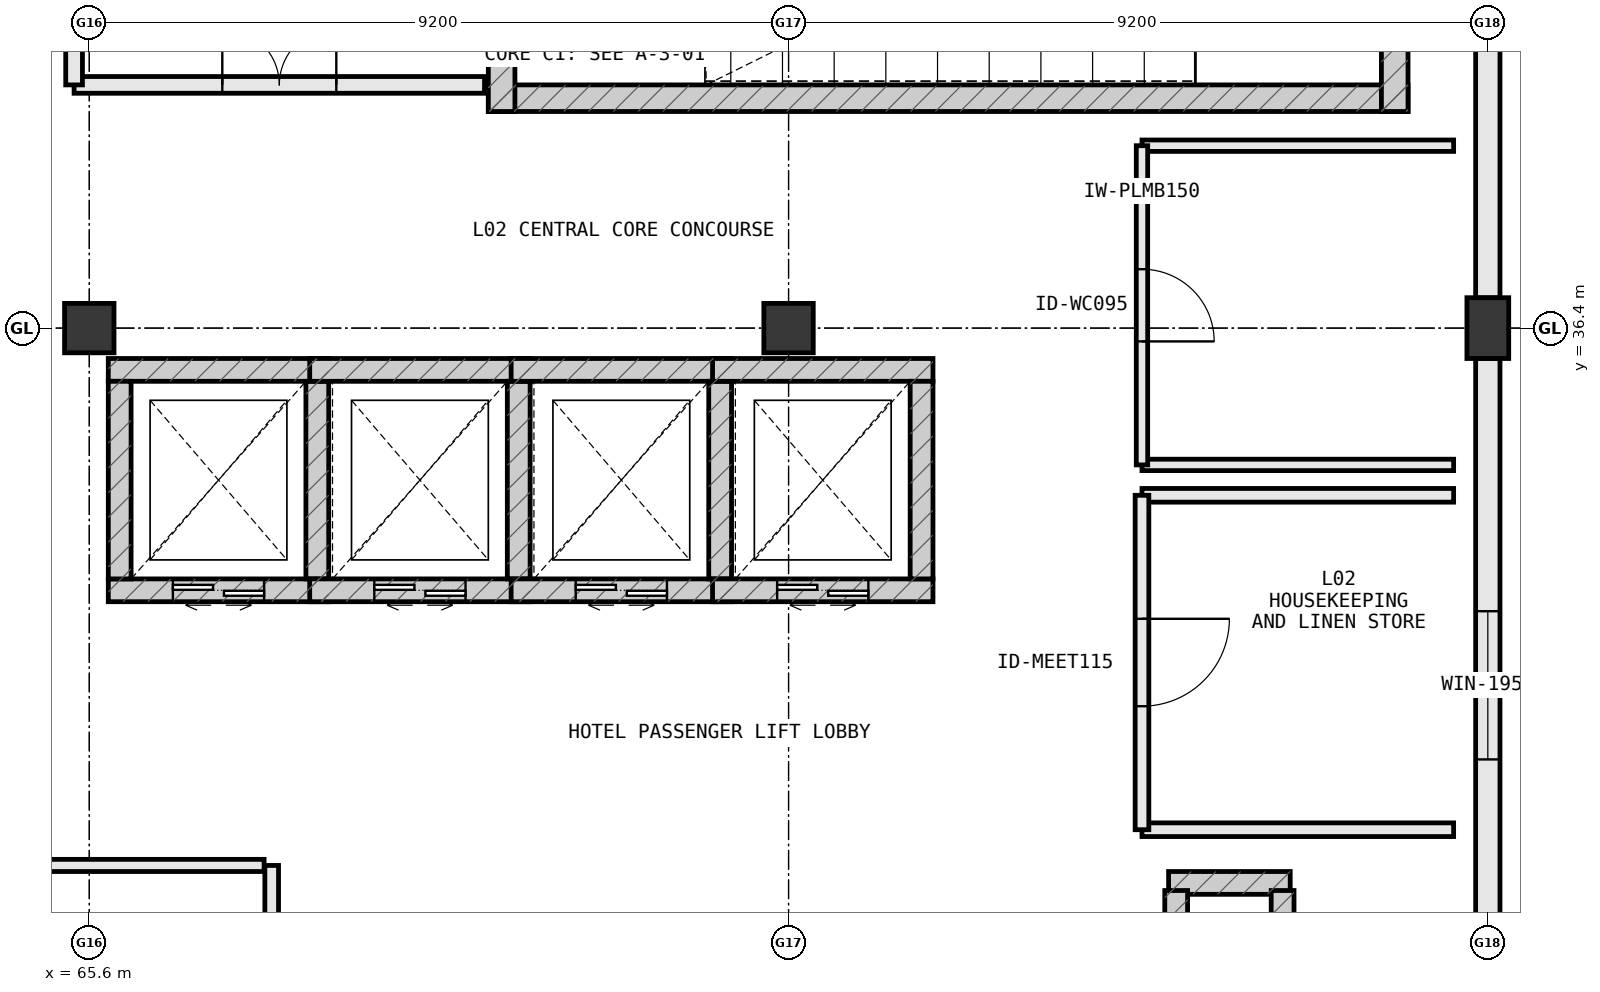
"""IFC4 building model, lengths in metres.
Left out: names, types, materials, properties, quantities, classifications, styles, units other than length and angle.
Written with IfcOpenShell. Run it as: python <this file> out.ifc"""

import sys

from ifc_helpers import new_model, si_unit, direction, frame, frame_2d, origin, origin_2d, place, context, subcontext, project, spatial, rectangle, extrude, element, fill, save


model = new_model("IFC4")
c1 = context("Model", 3, precision=1e-05, world=origin(), true_north=direction((0.0, 1.0)))
c2 = subcontext(c1, "Body", "Model", "MODEL_VIEW")
j1 = project(units=[si_unit("LENGTHUNIT", "METRE"), si_unit("PLANEANGLEUNIT", "RADIAN")], contexts=[c1])
p1 = place(None, origin())
s1 = spatial("IfcSite", under=j1, at=p1, CompositionType="ELEMENT")
p2 = place(p1, origin())
s2 = spatial("IfcBuilding", under=s1, at=p2, CompositionType="ELEMENT")
p3 = place(p2, frame((0.0, 0.0, 10.8)))
s3 = spatial("IfcBuildingStorey", under=s2, at=p3, CompositionType="ELEMENT", Elevation=10.8)
p4 = place(p3, frame((74.8, 36.4, 0.0), z_axis=(0.0, 0.0, 1.0), x_axis=(1.0, 0.0, 0.0)))
e1 = element("IfcColumn", 1, at=p4, inside=s3, PredefinedType="COLUMN", context=c2, shape_type="SweptSolid", body=[
    extrude(rectangle(XDim=0.65, YDim=0.65, at=origin_2d()), origin(), (0.0, 0.0, 1.0), 5.4),
])
p5 = place(p3, frame((84.0, 36.4, 0.0), z_axis=(0.0, 0.0, 1.0), x_axis=(1.0, 0.0, 0.0)))
e2 = element("IfcColumn", 2, at=p5, inside=s3, PredefinedType="PILASTER", context=c2, shape_type="SweptSolid", body=[
    extrude(rectangle(XDim=0.55, YDim=0.8, at=origin_2d()), origin(), (0.0, 0.0, 1.0), 5.4),
])
p6 = place(p3, frame((65.6, 36.4, 0.0), z_axis=(0.0, 0.0, 1.0), x_axis=(1.0, 0.0, 0.0)))
e3 = element("IfcColumn", 3, at=p6, inside=s3, PredefinedType="COLUMN", context=c2, shape_type="SweptSolid", body=[
    extrude(rectangle(XDim=0.65, YDim=0.65, at=origin_2d()), origin(), (0.0, 0.0, 1.0), 5.4),
])
p7 = place(p3, frame((81.4, 29.1, 0.0), z_axis=(0.0, 0.0, 1.0), x_axis=(-1.0, 0.0, 0.0)))
e4 = element("IfcWall", 4, at=p7, inside=s3, PredefinedType="SHEAR", context=c2, shape_type="SweptSolid", body=[
    extrude(rectangle(XDim=1.6, YDim=0.3, at=frame_2d((0.8, 0.0))), origin(), (0.0, 0.0, 1.0), 4.8),
])
for number, where, z_axis, x_axis in (
    (5, (79.9, 29.0, 0.0), (0.0, 0.0, 1.0), (0.0, -1.0, 0.0)),
    (6, (81.3, 27.8, 0.0), (0.0, 0.0, 1.0), (0.0, 1.0, 0.0)),
):
    element("IfcWall", number, at=place(p3, frame(where, z_axis=z_axis, x_axis=x_axis)), inside=s3, PredefinedType="SHEAR", context=c2, shape_type="SweptSolid", body=[
        extrude(rectangle(XDim=1.2, YDim=0.3, at=frame_2d((0.6, 0.0))), origin(), (0.0, 0.0, 1.0), 4.8),
    ])
p8 = place(p3, frame((84.0, 27.398, 0.0), z_axis=(0.0, 0.0, 1.0), x_axis=(0.0, 1.0, 0.0)))
e7 = element("IfcWall", 7, at=p8, inside=s3, PredefinedType="STANDARD", context=c2, shape_type="SweptSolid", body=[
    extrude(rectangle(XDim=8.604, YDim=0.32, at=frame_2d((4.302, 0.0))), origin(), (0.0, 0.0, 1.0), 4.332),
])
p9 = place(p8, frame((3.327, 0.0, 0.85)))
e8 = element("IfcOpeningElement", 8, at=p9, cuts=e7, PredefinedType="OPENING", context=c2, shape_type="SweptSolid", body=[
    extrude(rectangle(XDim=1.95, YDim=1.9, at=frame_2d((0.975, 0.95))), frame((0.0, 0.172, 0.0), z_axis=(0.0, -1.0, 0.0), x_axis=(1.0, 0.0, 0.0)), (0.0, 0.0, 1.0), 0.344),
])
p10 = place(p3, frame((84.0, 36.798, 0.0), z_axis=(0.0, 0.0, 1.0), x_axis=(0.0, 1.0, 0.0)))
e9 = element("IfcWall", 9, at=p10, inside=s3, PredefinedType="STANDARD", context=c2, shape_type="SweptSolid", body=[
    extrude(rectangle(XDim=10.004, YDim=0.32, at=frame_2d((5.002, 0.0))), origin(), (0.0, 0.0, 1.0), 4.332),
])
p11 = place(p10, frame((6.528, 0.0, 0.85)))
e10 = element("IfcOpeningElement", 10, at=p11, cuts=e9, PredefinedType="OPENING", context=c2, shape_type="SweptSolid", body=[
    extrude(rectangle(XDim=1.95, YDim=1.9, at=frame_2d((0.975, 0.95))), frame((0.0, 0.172, 0.0), z_axis=(0.0, -1.0, 0.0), x_axis=(1.0, 0.0, 0.0)), (0.0, 0.0, 1.0), 0.344),
])
p12 = place(p3, frame((70.85, 39.425, 0.0), z_axis=(0.0, 0.0, 1.0), x_axis=(1.0, 0.0, 0.0)))
e11 = element("IfcWall", 11, at=p12, inside=s3, PredefinedType="SHEAR", context=c2, shape_type="SweptSolid", body=[
    extrude(rectangle(XDim=12.1, YDim=0.35, at=frame_2d((6.05, 0.0))), origin(), (0.0, 0.0, 1.0), 5.4),
])
p13 = place(p3, frame((82.775, 39.25, 0.0), z_axis=(0.0, 0.0, 1.0), x_axis=(0.0, 1.0, 0.0)))
e12 = element("IfcWall", 12, at=p13, inside=s3, PredefinedType="SHEAR", context=c2, shape_type="SweptSolid", body=[
    extrude(rectangle(XDim=5.1, YDim=0.35, at=frame_2d((2.55, 0.0))), origin(), (0.0, 0.0, 1.0), 5.4),
])
p14 = place(p3, frame((71.025, 44.35, 0.0), z_axis=(0.0, 0.0, 1.0), x_axis=(0.0, -1.0, 0.0)))
e13 = element("IfcWall", 13, at=p14, inside=s3, PredefinedType="SHEAR", context=c2, shape_type="SweptSolid", body=[
    extrude(rectangle(XDim=5.1, YDim=0.35, at=frame_2d((2.55, 0.0))), origin(), (0.0, 0.0, 1.0), 5.4),
])
p15 = place(p14, frame((2.0, 0.0, 0.0)))
e14 = element("IfcOpeningElement", 14, at=p15, cuts=e13, PredefinedType="OPENING", context=c2, shape_type="SweptSolid", body=[
    extrude(rectangle(XDim=1.1, YDim=2.2, at=frame_2d((0.55, 1.1))), frame((0.0, 0.187, 0.0), z_axis=(0.0, -1.0, 0.0), x_axis=(1.0, 0.0, 0.0)), (0.0, 0.0, 1.0), 0.374),
])
p16 = place(p3, frame((65.85, 32.95, 0.0), z_axis=(0.0, 0.0, 1.0), x_axis=(1.0, 0.0, 0.0)))
e15 = element("IfcWall", 15, at=p16, inside=s3, PredefinedType="SHEAR", context=c2, shape_type="SweptSolid", body=[
    extrude(rectangle(XDim=2.9, YDim=0.3, at=frame_2d((1.45, 0.0))), origin(), (0.0, 0.0, 1.0), 5.4),
])
p17 = place(p16, frame((0.85, 0.0, 0.0)))
e16 = element("IfcOpeningElement", 16, at=p17, cuts=e15, PredefinedType="OPENING", context=c2, shape_type="SweptSolid", body=[
    extrude(rectangle(XDim=1.2, YDim=2.2, at=frame_2d((0.6, 1.1))), frame((0.0, 0.162, 0.0), z_axis=(0.0, -1.0, 0.0), x_axis=(1.0, 0.0, 0.0)), (0.0, 0.0, 1.0), 0.324),
])
p18 = place(p3, frame((68.75, 35.85, 0.0), z_axis=(0.0, 0.0, 1.0), x_axis=(-1.0, 0.0, 0.0)))
e17 = element("IfcWall", 17, at=p18, inside=s3, PredefinedType="SHEAR", context=c2, shape_type="SweptSolid", body=[
    extrude(rectangle(XDim=2.9, YDim=0.3, at=frame_2d((1.45, 0.0))), origin(), (0.0, 0.0, 1.0), 5.4),
])
for number, where, z_axis, x_axis in (
    (18, (68.6, 33.1, 0.0), (0.0, 0.0, 1.0), (0.0, 1.0, 0.0)),
    (19, (66.0, 35.7, 0.0), (0.0, 0.0, 1.0), (0.0, -1.0, 0.0)),
):
    element("IfcWall", number, at=place(p3, frame(where, z_axis=z_axis, x_axis=x_axis)), inside=s3, PredefinedType="SHEAR", context=c2, shape_type="SweptSolid", body=[
        extrude(rectangle(XDim=2.6, YDim=0.3, at=frame_2d((1.3, 0.0))), origin(), (0.0, 0.0, 1.0), 5.4),
    ])
p19 = place(p3, frame((68.5, 32.95, 0.0), z_axis=(0.0, 0.0, 1.0), x_axis=(1.0, 0.0, 0.0)))
e20 = element("IfcWall", 20, at=p19, inside=s3, PredefinedType="SHEAR", context=c2, shape_type="SweptSolid", body=[
    extrude(rectangle(XDim=2.9, YDim=0.3, at=frame_2d((1.45, 0.0))), origin(), (0.0, 0.0, 1.0), 5.4),
])
p20 = place(p19, frame((0.85, 0.0, 0.0)))
e21 = element("IfcOpeningElement", 21, at=p20, cuts=e20, PredefinedType="OPENING", context=c2, shape_type="SweptSolid", body=[
    extrude(rectangle(XDim=1.2, YDim=2.2, at=frame_2d((0.6, 1.1))), frame((0.0, 0.162, 0.0), z_axis=(0.0, -1.0, 0.0), x_axis=(1.0, 0.0, 0.0)), (0.0, 0.0, 1.0), 0.324),
])
p21 = place(p3, frame((71.4, 35.85, 0.0), z_axis=(0.0, 0.0, 1.0), x_axis=(-1.0, 0.0, 0.0)))
e22 = element("IfcWall", 22, at=p21, inside=s3, PredefinedType="SHEAR", context=c2, shape_type="SweptSolid", body=[
    extrude(rectangle(XDim=2.9, YDim=0.3, at=frame_2d((1.45, 0.0))), origin(), (0.0, 0.0, 1.0), 5.4),
])
p22 = place(p3, frame((71.25, 33.1, 0.0), z_axis=(0.0, 0.0, 1.0), x_axis=(0.0, 1.0, 0.0)))
e23 = element("IfcWall", 23, at=p22, inside=s3, PredefinedType="SHEAR", context=c2, shape_type="SweptSolid", body=[
    extrude(rectangle(XDim=2.6, YDim=0.3, at=frame_2d((1.3, 0.0))), origin(), (0.0, 0.0, 1.0), 5.4),
])
p23 = place(p3, frame((71.15, 32.95, 0.0), z_axis=(0.0, 0.0, 1.0), x_axis=(1.0, 0.0, 0.0)))
e24 = element("IfcWall", 24, at=p23, inside=s3, PredefinedType="SHEAR", context=c2, shape_type="SweptSolid", body=[
    extrude(rectangle(XDim=2.9, YDim=0.3, at=frame_2d((1.45, 0.0))), origin(), (0.0, 0.0, 1.0), 5.4),
])
p24 = place(p23, frame((0.85, 0.0, 0.0)))
e25 = element("IfcOpeningElement", 25, at=p24, cuts=e24, PredefinedType="OPENING", context=c2, shape_type="SweptSolid", body=[
    extrude(rectangle(XDim=1.2, YDim=2.2, at=frame_2d((0.6, 1.1))), frame((0.0, 0.162, 0.0), z_axis=(0.0, -1.0, 0.0), x_axis=(1.0, 0.0, 0.0)), (0.0, 0.0, 1.0), 0.324),
])
p25 = place(p3, frame((74.05, 35.85, 0.0), z_axis=(0.0, 0.0, 1.0), x_axis=(-1.0, 0.0, 0.0)))
e26 = element("IfcWall", 26, at=p25, inside=s3, PredefinedType="SHEAR", context=c2, shape_type="SweptSolid", body=[
    extrude(rectangle(XDim=2.9, YDim=0.3, at=frame_2d((1.45, 0.0))), origin(), (0.0, 0.0, 1.0), 5.4),
])
p26 = place(p3, frame((73.9, 33.1, 0.0), z_axis=(0.0, 0.0, 1.0), x_axis=(0.0, 1.0, 0.0)))
e27 = element("IfcWall", 27, at=p26, inside=s3, PredefinedType="SHEAR", context=c2, shape_type="SweptSolid", body=[
    extrude(rectangle(XDim=2.6, YDim=0.3, at=frame_2d((1.3, 0.0))), origin(), (0.0, 0.0, 1.0), 5.4),
])
p27 = place(p3, frame((73.8, 32.95, 0.0), z_axis=(0.0, 0.0, 1.0), x_axis=(1.0, 0.0, 0.0)))
e28 = element("IfcWall", 28, at=p27, inside=s3, PredefinedType="SHEAR", context=c2, shape_type="SweptSolid", body=[
    extrude(rectangle(XDim=2.9, YDim=0.3, at=frame_2d((1.45, 0.0))), origin(), (0.0, 0.0, 1.0), 5.4),
])
p28 = place(p27, frame((0.85, 0.0, 0.0)))
e29 = element("IfcOpeningElement", 29, at=p28, cuts=e28, PredefinedType="OPENING", context=c2, shape_type="SweptSolid", body=[
    extrude(rectangle(XDim=1.2, YDim=2.2, at=frame_2d((0.6, 1.1))), frame((0.0, 0.162, 0.0), z_axis=(0.0, -1.0, 0.0), x_axis=(1.0, 0.0, 0.0)), (0.0, 0.0, 1.0), 0.324),
])
p29 = place(p3, frame((76.7, 35.85, 0.0), z_axis=(0.0, 0.0, 1.0), x_axis=(-1.0, 0.0, 0.0)))
e30 = element("IfcWall", 30, at=p29, inside=s3, PredefinedType="SHEAR", context=c2, shape_type="SweptSolid", body=[
    extrude(rectangle(XDim=2.9, YDim=0.3, at=frame_2d((1.45, 0.0))), origin(), (0.0, 0.0, 1.0), 5.4),
])
p30 = place(p3, frame((76.55, 33.1, 0.0), z_axis=(0.0, 0.0, 1.0), x_axis=(0.0, 1.0, 0.0)))
e31 = element("IfcWall", 31, at=p30, inside=s3, PredefinedType="SHEAR", context=c2, shape_type="SweptSolid", body=[
    extrude(rectangle(XDim=2.6, YDim=0.3, at=frame_2d((1.3, 0.0))), origin(), (0.0, 0.0, 1.0), 5.4),
])
p31 = place(p3, frame((65.4, 39.6, 0.0), z_axis=(0.0, 0.0, 1.0), x_axis=(1.0, 0.0, 0.0)))
e32 = element("IfcWall", 32, at=p31, inside=s3, PredefinedType="STANDARD", context=c2, shape_type="SweptSolid", body=[
    extrude(rectangle(XDim=5.4, YDim=0.22, at=frame_2d((2.7, 0.0))), origin(), (0.0, 0.0, 1.0), 4.8),
])
p32 = place(p31, frame((1.95, 0.0, 0.0)))
e33 = element("IfcOpeningElement", 33, at=p32, cuts=e32, PredefinedType="OPENING", context=c2, shape_type="SweptSolid", body=[
    extrude(rectangle(XDim=1.5, YDim=2.2, at=frame_2d((0.75, 1.1))), frame((0.0, 0.122, 0.0), z_axis=(0.0, -1.0, 0.0), x_axis=(1.0, 0.0, 0.0)), (0.0, 0.0, 1.0), 0.244),
])
p33 = place(p3, frame((65.4, 43.85, 0.0), z_axis=(0.0, 0.0, 1.0), x_axis=(0.0, -1.0, 0.0)))
e34 = element("IfcWall", 34, at=p33, inside=s3, PredefinedType="STANDARD", context=c2, shape_type="SweptSolid", body=[
    extrude(rectangle(XDim=4.25, YDim=0.22, at=frame_2d((2.125, 0.0))), origin(), (0.0, 0.0, 1.0), 4.8),
])
p34 = place(p33, frame((1.375, 0.0, 0.0)))
e35 = element("IfcOpeningElement", 35, at=p34, cuts=e34, PredefinedType="OPENING", context=c2, shape_type="SweptSolid", body=[
    extrude(rectangle(XDim=1.5, YDim=2.2, at=frame_2d((0.75, 1.1))), frame((0.0, 0.122, 0.0), z_axis=(0.0, -1.0, 0.0), x_axis=(1.0, 0.0, 0.0)), (0.0, 0.0, 1.0), 0.244),
])
for number, where, z_axis, x_axis in (
    (36, (79.45, 29.8, 0.0), (0.0, 0.0, 1.0), (1.0, 0.0, 0.0)),
    (37, (83.55, 34.2, 0.0), (0.0, 0.0, 1.0), (-1.0, 0.0, 0.0)),
):
    element("IfcWall", number, at=place(p3, frame(where, z_axis=z_axis, x_axis=x_axis)), inside=s3, PredefinedType="PARTITIONING", context=c2, shape_type="SweptSolid", body=[
        extrude(rectangle(XDim=4.1, YDim=0.18, at=frame_2d((2.05, 0.0))), origin(), (0.0, 0.0, 1.0), 4.8),
    ])
p35 = place(p3, frame((79.45, 34.2, 0.0), z_axis=(0.0, 0.0, 1.0), x_axis=(0.0, -1.0, 0.0)))
e38 = element("IfcWall", 38, at=p35, inside=s3, PredefinedType="PARTITIONING", context=c2, shape_type="SweptSolid", body=[
    extrude(rectangle(XDim=4.4, YDim=0.18, at=frame_2d((2.2, 0.0))), origin(), (0.0, 0.0, 1.0), 4.8),
])
p36 = place(p35, frame((1.625, 0.0, 0.0)))
e39 = element("IfcOpeningElement", 39, at=p36, cuts=e38, PredefinedType="OPENING", context=c2, shape_type="SweptSolid", body=[
    extrude(rectangle(XDim=1.15, YDim=2.2, at=frame_2d((0.575, 1.1))), frame((0.0, 0.102, 0.0), z_axis=(0.0, -1.0, 0.0), x_axis=(1.0, 0.0, 0.0)), (0.0, 0.0, 1.0), 0.204),
])
for number, where, z_axis, x_axis in (
    (40, (79.45, 34.6, 0.0), (0.0, 0.0, 1.0), (1.0, 0.0, 0.0)),
    (41, (83.55, 38.8, 0.0), (0.0, 0.0, 1.0), (-1.0, 0.0, 0.0)),
):
    element("IfcWall", number, at=place(p3, frame(where, z_axis=z_axis, x_axis=x_axis)), inside=s3, PredefinedType="PLUMBINGWALL", context=c2, shape_type="SweptSolid", body=[
        extrude(rectangle(XDim=4.1, YDim=0.15, at=frame_2d((2.05, 0.0))), origin(), (0.0, 0.0, 1.0), 4.8),
    ])
p37 = place(p3, frame((79.45, 38.8, 0.0), z_axis=(0.0, 0.0, 1.0), x_axis=(0.0, -1.0, 0.0)))
e42 = element("IfcWall", 42, at=p37, inside=s3, PredefinedType="PLUMBINGWALL", context=c2, shape_type="SweptSolid", body=[
    extrude(rectangle(XDim=4.2, YDim=0.15, at=frame_2d((2.1, 0.0))), origin(), (0.0, 0.0, 1.0), 4.8),
])
p38 = place(p37, frame((1.625, 0.0, 0.0)))
e43 = element("IfcOpeningElement", 43, at=p38, cuts=e42, PredefinedType="OPENING", context=c2, shape_type="SweptSolid", body=[
    extrude(rectangle(XDim=0.95, YDim=2.15, at=frame_2d((0.475, 1.075))), frame((0.0, 0.087, 0.0), z_axis=(0.0, -1.0, 0.0), x_axis=(1.0, 0.0, 0.0)), (0.0, 0.0, 1.0), 0.174),
])
p39 = place(p3, frame((68.0, 23.85, 0.0), z_axis=(0.0, 0.0, 1.0), x_axis=(0.0, 1.0, 0.0)))
e44 = element("IfcWall", 44, at=p39, inside=s3, PredefinedType="PARTITIONING", context=c2, shape_type="SweptSolid", body=[
    extrude(rectangle(XDim=5.48, YDim=0.18, at=frame_2d((2.74, 0.0))), origin(), (0.0, 0.0, 1.0), 4.8),
])
p40 = place(p39, frame((3.22, 0.0, 0.0)))
e45 = element("IfcOpeningElement", 45, at=p40, cuts=e44, PredefinedType="OPENING", context=c2, shape_type="SweptSolid", body=[
    extrude(rectangle(XDim=1.0, YDim=2.2, at=frame_2d((0.5, 1.1))), frame((0.0, 0.102, 0.0), z_axis=(0.0, -1.0, 0.0), x_axis=(1.0, 0.0, 0.0)), (0.0, 0.0, 1.0), 0.204),
])
p41 = place(p3, frame((60.96, 29.33, 0.0), z_axis=(0.0, 0.0, 1.0), x_axis=(1.0, 0.0, 0.0)))
e46 = element("IfcWall", 46, at=p41, inside=s3, PredefinedType="PARTITIONING", context=c2, shape_type="SweptSolid", body=[
    extrude(rectangle(XDim=6.94, YDim=0.16, at=frame_2d((3.47, 0.0))), origin(), (0.0, 0.0, 1.0), 4.8),
])
p42 = place(p9, origin())
e47 = element("IfcWindow", 47, at=p42, inside=s3, PartitioningType="DOUBLE_PANEL_VERTICAL", PredefinedType="WINDOW", context=c2, shape_type="SweptSolid", body=[
    extrude(rectangle(XDim=1.95, YDim=1.9, at=frame_2d((0.975, 0.95))), frame((0.0, 0.03, 0.0), z_axis=(0.0, -1.0, 0.0), x_axis=(1.0, 0.0, 0.0)), (0.0, 0.0, 1.0), 0.06),
])
fill(e8, e47)
p43 = place(p17, origin())
e48 = element("IfcDoor", 48, at=p43, inside=s3, OperationType="DOUBLE_DOOR_SLIDING", PredefinedType="DOOR", context=c2, shape_type="SweptSolid", body=[
    extrude(rectangle(XDim=1.2, YDim=2.2, at=frame_2d((0.6, 1.1))), frame((0.0, 0.025, 0.0), z_axis=(0.0, -1.0, 0.0), x_axis=(1.0, 0.0, 0.0)), (0.0, 0.0, 1.0), 0.05),
])
fill(e16, e48)
p44 = place(p20, origin())
e49 = element("IfcDoor", 49, at=p44, inside=s3, OperationType="DOUBLE_DOOR_SLIDING", PredefinedType="DOOR", context=c2, shape_type="SweptSolid", body=[
    extrude(rectangle(XDim=1.2, YDim=2.2, at=frame_2d((0.6, 1.1))), frame((0.0, 0.025, 0.0), z_axis=(0.0, -1.0, 0.0), x_axis=(1.0, 0.0, 0.0)), (0.0, 0.0, 1.0), 0.05),
])
fill(e21, e49)
p45 = place(p24, origin())
e50 = element("IfcDoor", 50, at=p45, inside=s3, OperationType="DOUBLE_DOOR_SLIDING", PredefinedType="DOOR", context=c2, shape_type="SweptSolid", body=[
    extrude(rectangle(XDim=1.2, YDim=2.2, at=frame_2d((0.6, 1.1))), frame((0.0, 0.025, 0.0), z_axis=(0.0, -1.0, 0.0), x_axis=(1.0, 0.0, 0.0)), (0.0, 0.0, 1.0), 0.05),
])
fill(e25, e50)
p46 = place(p28, origin())
e51 = element("IfcDoor", 51, at=p46, inside=s3, OperationType="DOUBLE_DOOR_SLIDING", PredefinedType="DOOR", context=c2, shape_type="SweptSolid", body=[
    extrude(rectangle(XDim=1.2, YDim=2.2, at=frame_2d((0.6, 1.1))), frame((0.0, 0.025, 0.0), z_axis=(0.0, -1.0, 0.0), x_axis=(1.0, 0.0, 0.0)), (0.0, 0.0, 1.0), 0.05),
])
fill(e29, e51)
p47 = place(p32, origin())
e52 = element("IfcDoor", 52, at=p47, inside=s3, OperationType="DOUBLE_DOOR_SINGLE_SWING", PredefinedType="DOOR", context=c2, shape_type="SweptSolid", body=[
    extrude(rectangle(XDim=1.5, YDim=2.2, at=frame_2d((0.75, 1.1))), frame((0.0, 0.025, 0.0), z_axis=(0.0, -1.0, 0.0), x_axis=(1.0, 0.0, 0.0)), (0.0, 0.0, 1.0), 0.05),
])
fill(e33, e52)
p48 = place(p36, origin())
e53 = element("IfcDoor", 53, at=p48, inside=s3, OperationType="SINGLE_SWING_LEFT", PredefinedType="DOOR", context=c2, shape_type="SweptSolid", body=[
    extrude(rectangle(XDim=1.15, YDim=2.2, at=frame_2d((0.575, 1.1))), frame((0.0, 0.025, 0.0), z_axis=(0.0, -1.0, 0.0), x_axis=(1.0, 0.0, 0.0)), (0.0, 0.0, 1.0), 0.05),
])
fill(e39, e53)
p49 = place(p38, origin())
e54 = element("IfcDoor", 54, at=p49, inside=s3, OperationType="SINGLE_SWING_RIGHT", PredefinedType="DOOR", context=c2, shape_type="SweptSolid", body=[
    extrude(rectangle(XDim=0.95, YDim=2.15, at=frame_2d((0.475, 1.075))), frame((0.0, 0.025, 0.0), z_axis=(0.0, -1.0, 0.0), x_axis=(1.0, 0.0, 0.0)), (0.0, 0.0, 1.0), 0.05),
])
fill(e43, e54)
save(model, sys.argv[1])
